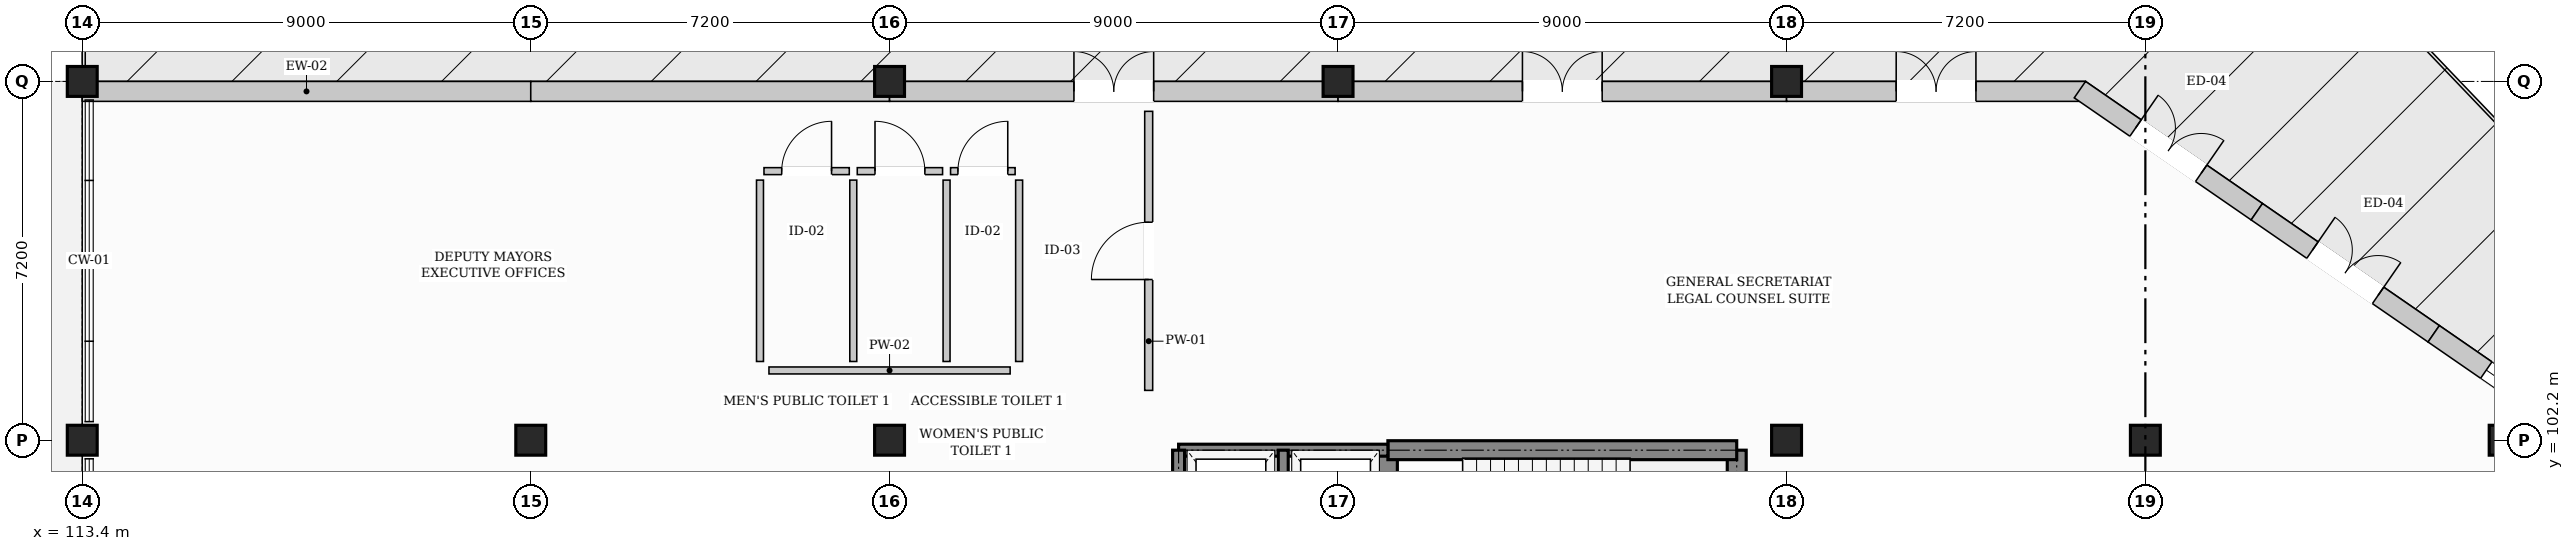
"""IFC4 building model, lengths in metres.
Left out: names, types, materials, properties, quantities, classifications, styles, units other than length and angle.
Written with IfcOpenShell. Run it as: python <this file> out.ifc"""

import sys

from ifc_helpers import new_model, si_unit, direction, frame, frame_2d, origin, origin_2d, place, context, subcontext, project, spatial, rectangle, extrude, element, fill, save


model = new_model("IFC4")
c1 = context("Model", 3, precision=1e-05, world=origin(), true_north=direction((0.0, 1.0)))
c2 = subcontext(c1, "Body", "Model", "MODEL_VIEW")
j1 = project(units=[si_unit("LENGTHUNIT", "METRE"), si_unit("PLANEANGLEUNIT", "RADIAN")], contexts=[c1])
p1 = place(None, origin())
s1 = spatial("IfcSite", under=j1, at=p1, CompositionType="ELEMENT")
p2 = place(p1, origin())
s2 = spatial("IfcBuilding", under=s1, at=p2, CompositionType="ELEMENT")
p3 = place(p2, frame((0.0, 0.0, 24.0)))
s3 = spatial("IfcBuildingStorey", under=s2, at=p3, CompositionType="ELEMENT", Elevation=24.0)
for number, where, z_axis, x_axis in (
    (1, (113.4, 102.2, 0.0), (0.0, 0.0, 1.0), (1.0, 0.0, 0.0)),
    (2, (113.4, 109.4, 0.0), (0.0, 0.0, 1.0), (1.0, 0.0, 0.0)),
    (3, (122.4, 102.2, 0.0), (0.0, 0.0, 1.0), (1.0, 0.0, 0.0)),
    (4, (129.6, 102.2, 0.0), (0.0, 0.0, 1.0), (1.0, 0.0, 0.0)),
    (5, (129.6, 109.4, 0.0), (0.0, 0.0, 1.0), (1.0, 0.0, 0.0)),
    (6, (138.6, 109.4, 0.0), (0.0, 0.0, 1.0), (1.0, 0.0, 0.0)),
    (7, (147.6, 102.2, 0.0), (0.0, 0.0, 1.0), (1.0, 0.0, 0.0)),
    (8, (147.6, 109.4, 0.0), (0.0, 0.0, 1.0), (1.0, 0.0, 0.0)),
    (9, (154.8, 102.2, 0.0), (0.0, 0.0, 1.0), (1.0, 0.0, 0.0)),
    (10, (162.0, 102.2, 0.0), (0.0, 0.0, 1.0), (1.0, 0.0, 0.0)),
):
    element("IfcColumn", number, at=place(p3, frame(where, z_axis=z_axis, x_axis=x_axis)), inside=s3, PredefinedType="COLUMN", context=c2, shape_type="SweptSolid", body=[
        extrude(rectangle(XDim=0.6, YDim=0.6, at=origin_2d()), origin(), (0.0, 0.0, 1.0), 3.6),
    ])
p4 = place(p3, frame((113.4, 109.2, 0.0), z_axis=(0.0, 0.0, 1.0), x_axis=(1.0, 0.0, 0.0)))
e11 = element("IfcWall", 11, at=p4, inside=s3, PredefinedType="SOLIDWALL", context=c2, shape_type="SweptSolid", body=[
    extrude(rectangle(XDim=9.0, YDim=0.4, at=frame_2d((4.5, 0.0))), origin(), (0.0, 0.0, 1.0), 2.8),
])
p5 = place(p3, frame((122.4, 109.2, 0.0), z_axis=(0.0, 0.0, 1.0), x_axis=(1.0, 0.0, 0.0)))
e12 = element("IfcWall", 12, at=p5, inside=s3, PredefinedType="SOLIDWALL", context=c2, shape_type="SweptSolid", body=[
    extrude(rectangle(XDim=7.2, YDim=0.4, at=frame_2d((3.6, 0.0))), origin(), (0.0, 0.0, 1.0), 2.64),
])
p6 = place(p3, frame((129.6, 109.2, 0.0), z_axis=(0.0, 0.0, 1.0), x_axis=(1.0, 0.0, 0.0)))
e13 = element("IfcWall", 13, at=p6, inside=s3, PredefinedType="SOLIDWALL", context=c2, shape_type="SweptSolid", body=[
    extrude(rectangle(XDim=9.0, YDim=0.4, at=frame_2d((4.5, 0.0))), origin(), (0.0, 0.0, 1.0), 2.64),
])
p7 = place(p6, frame((3.7, 0.0, 0.0)))
e14 = element("IfcOpeningElement", 14, at=p7, cuts=e13, PredefinedType="OPENING", context=c2, shape_type="SweptSolid", body=[
    extrude(rectangle(XDim=1.6, YDim=2.25, at=frame_2d((0.8, 1.125))), frame((0.0, 0.21, 0.0), z_axis=(0.0, -1.0, 0.0), x_axis=(1.0, 0.0, 0.0)), (0.0, 0.0, 1.0), 0.42),
])
p8 = place(p3, frame((138.6, 109.2, 0.0), z_axis=(0.0, 0.0, 1.0), x_axis=(1.0, 0.0, 0.0)))
e15 = element("IfcWall", 15, at=p8, inside=s3, PredefinedType="SOLIDWALL", context=c2, shape_type="SweptSolid", body=[
    extrude(rectangle(XDim=9.0, YDim=0.4, at=frame_2d((4.5, 0.0))), origin(), (0.0, 0.0, 1.0), 2.64),
])
p9 = place(p8, frame((3.7, 0.0, 0.0)))
e16 = element("IfcOpeningElement", 16, at=p9, cuts=e15, PredefinedType="OPENING", context=c2, shape_type="SweptSolid", body=[
    extrude(rectangle(XDim=1.6, YDim=2.25, at=frame_2d((0.8, 1.125))), frame((0.0, 0.21, 0.0), z_axis=(0.0, -1.0, 0.0), x_axis=(1.0, 0.0, 0.0)), (0.0, 0.0, 1.0), 0.42),
])
p10 = place(p3, frame((147.6, 109.2, 0.0), z_axis=(0.0, 0.0, 1.0), x_axis=(1.0, 0.0, 0.0)))
e17 = element("IfcWall", 17, at=p10, inside=s3, PredefinedType="SOLIDWALL", context=c2, shape_type="SweptSolid", body=[
    extrude(rectangle(XDim=6.0, YDim=0.4, at=frame_2d((3.0, 0.0))), origin(), (0.0, 0.0, 1.0), 2.68),
])
p11 = place(p10, frame((2.2, 0.0, 0.0)))
e18 = element("IfcOpeningElement", 18, at=p11, cuts=e17, PredefinedType="OPENING", context=c2, shape_type="SweptSolid", body=[
    extrude(rectangle(XDim=1.6, YDim=2.25, at=frame_2d((0.8, 1.125))), frame((0.0, 0.21, 0.0), z_axis=(0.0, -1.0, 0.0), x_axis=(1.0, 0.0, 0.0)), (0.0, 0.0, 1.0), 0.42),
])
p12 = place(p3, frame((153.486, 109.235, 0.0), z_axis=(0.0, 0.0, 1.0), x_axis=(0.823034869744, -0.567990847801, 0.0)))
e19 = element("IfcWall", 19, at=p12, inside=s3, PredefinedType="SOLIDWALL", context=c2, shape_type="SweptSolid", body=[
    extrude(rectangle(XDim=4.313, YDim=0.4, at=frame_2d((2.157, 0.0))), origin(), (0.0, 0.0, 1.0), 3.36),
])
p13 = place(p12, frame((1.357, 0.0, 0.0)))
e20 = element("IfcOpeningElement", 20, at=p13, cuts=e19, PredefinedType="OPENING", context=c2, shape_type="SweptSolid", body=[
    extrude(rectangle(XDim=1.6, YDim=2.25, at=frame_2d((0.8, 1.125))), frame((0.0, 0.21, 0.0), z_axis=(0.0, -1.0, 0.0), x_axis=(1.0, 0.0, 0.0)), (0.0, 0.0, 1.0), 0.42),
])
p14 = place(p3, frame((157.036, 106.785, 0.0), z_axis=(0.0, 0.0, 1.0), x_axis=(0.823034869744, -0.567990847801, 0.0)))
e21 = element("IfcWall", 21, at=p14, inside=s3, PredefinedType="SOLIDWALL", context=c2, shape_type="SweptSolid", body=[
    extrude(rectangle(XDim=4.313, YDim=0.4, at=frame_2d((2.157, 0.0))), origin(), (0.0, 0.0, 1.0), 3.36),
])
p15 = place(p14, frame((1.357, 0.0, 0.0)))
e22 = element("IfcOpeningElement", 22, at=p15, cuts=e21, PredefinedType="OPENING", context=c2, shape_type="SweptSolid", body=[
    extrude(rectangle(XDim=1.6, YDim=2.25, at=frame_2d((0.8, 1.125))), frame((0.0, 0.21, 0.0), z_axis=(0.0, -1.0, 0.0), x_axis=(1.0, 0.0, 0.0)), (0.0, 0.0, 1.0), 0.42),
])
p16 = place(p3, frame((160.586, 104.335, 0.0), z_axis=(0.0, 0.0, 1.0), x_axis=(0.823034869744, -0.567990847801, 0.0)))
e23 = element("IfcWall", 23, at=p16, inside=s3, PredefinedType="SOLIDWALL", context=c2, shape_type="SweptSolid", body=[
    extrude(rectangle(XDim=4.313, YDim=0.4, at=frame_2d((2.157, 0.0))), origin(), (0.0, 0.0, 1.0), 3.36),
])
p17 = place(p16, frame((1.282, 0.0, 0.8)))
e24 = element("IfcOpeningElement", 24, at=p17, cuts=e23, PredefinedType="OPENING", context=c2, shape_type="SweptSolid", body=[
    extrude(rectangle(XDim=1.75, YDim=1.55, at=frame_2d((0.875, 0.775))), frame((0.0, 0.21, 0.0), z_axis=(0.0, -1.0, 0.0), x_axis=(1.0, 0.0, 0.0)), (0.0, 0.0, 1.0), 0.42),
])
p18 = place(p3, frame((139.6, 96.0, 0.0), z_axis=(0.0, 0.0, 1.0), x_axis=(0.0, 1.0, 0.0)))
e25 = element("IfcWall", 25, at=p18, inside=s3, PredefinedType="SHEAR", context=c2, shape_type="SweptSolid", body=[
    extrude(rectangle(XDim=6.0, YDim=0.38, at=frame_2d((3.0, 0.0))), origin(), (0.0, 0.0, 1.0), 3.34),
])
p19 = place(p18, frame((1.275, 0.0, 0.0)))
e26 = element("IfcOpeningElement", 26, at=p19, cuts=e25, PredefinedType="OPENING", context=c2, shape_type="SweptSolid", body=[
    extrude(rectangle(XDim=1.05, YDim=2.15, at=frame_2d((0.525, 1.075))), frame((0.0, 0.2, 0.0), z_axis=(0.0, -1.0, 0.0), x_axis=(1.0, 0.0, 0.0)), (0.0, 0.0, 1.0), 0.4),
])
p20 = place(p3, frame((146.6, 96.0, 0.0), z_axis=(0.0, 0.0, 1.0), x_axis=(0.0, 1.0, 0.0)))
e27 = element("IfcWall", 27, at=p20, inside=s3, PredefinedType="SHEAR", context=c2, shape_type="SweptSolid", body=[
    extrude(rectangle(XDim=6.0, YDim=0.38, at=frame_2d((3.0, 0.0))), origin(), (0.0, 0.0, 1.0), 3.34),
])
p21 = place(p3, frame((139.6, 102.0, 0.0), z_axis=(0.0, 0.0, 1.0), x_axis=(1.0, 0.0, 0.0)))
e28 = element("IfcWall", 28, at=p21, inside=s3, PredefinedType="SHEAR", context=c2, shape_type="SweptSolid", body=[
    extrude(rectangle(XDim=7.0, YDim=0.38, at=frame_2d((3.5, 0.0))), origin(), (0.0, 0.0, 1.0), 3.34),
])
p22 = place(p3, frame((135.4, 102.0, 0.0), z_axis=(0.0, 0.0, 1.0), x_axis=(1.0, 0.0, 0.0)))
e29 = element("IfcWall", 29, at=p22, inside=s3, PredefinedType="SHEAR", context=c2, shape_type="SweptSolid", body=[
    extrude(rectangle(XDim=4.2, YDim=0.24, at=frame_2d((2.1, 0.0))), origin(), (0.0, 0.0, 1.0), 3.34),
])
p23 = place(p3, frame((135.4, 99.65, 0.0), z_axis=(0.0, 0.0, 1.0), x_axis=(0.0, 1.0, 0.0)))
e30 = element("IfcWall", 30, at=p23, inside=s3, PredefinedType="SHEAR", context=c2, shape_type="SweptSolid", body=[
    extrude(rectangle(XDim=2.35, YDim=0.24, at=frame_2d((1.175, 0.0))), origin(), (0.0, 0.0, 1.0), 3.34),
])
p24 = place(p3, frame((137.5, 99.65, 0.0), z_axis=(0.0, 0.0, 1.0), x_axis=(0.0, 1.0, 0.0)))
e31 = element("IfcWall", 31, at=p24, inside=s3, PredefinedType="SHEAR", context=c2, shape_type="SweptSolid", body=[
    extrude(rectangle(XDim=2.35, YDim=0.2, at=frame_2d((1.175, 0.0))), origin(), (0.0, 0.0, 1.0), 3.34),
])
p25 = place(p3, frame((127.18, 103.6, 0.0), z_axis=(0.0, 0.0, 1.0), x_axis=(1.0, 0.0, 0.0)))
e32 = element("IfcWall", 32, at=p25, inside=s3, PredefinedType="PARTITIONING", context=c2, shape_type="SweptSolid", body=[
    extrude(rectangle(XDim=4.84, YDim=0.14, at=frame_2d((2.42, 0.0))), origin(), (0.0, 0.0, 1.0), 3.03),
])
for number, where, z_axis, x_axis in (
    (33, (127.0, 103.78, 0.0), (0.0, 0.0, 1.0), (0.0, 1.0, 0.0)),
    (34, (132.2, 103.78, 0.0), (0.0, 0.0, 1.0), (0.0, 1.0, 0.0)),
    (35, (128.872, 103.78, 0.0), (0.0, 0.0, 1.0), (0.0, 1.0, 0.0)),
    (36, (130.744, 103.78, 0.0), (0.0, 0.0, 1.0), (0.0, 1.0, 0.0)),
):
    element("IfcWall", number, at=place(p3, frame(where, z_axis=z_axis, x_axis=x_axis)), inside=s3, PredefinedType="PARTITIONING", context=c2, shape_type="SweptSolid", body=[
        extrude(rectangle(XDim=3.64, YDim=0.14, at=frame_2d((1.82, 0.0))), origin(), (0.0, 0.0, 1.0), 3.36),
    ])
p26 = place(p3, frame((127.08, 107.6, 0.0), z_axis=(0.0, 0.0, 1.0), x_axis=(1.0, 0.0, 0.0)))
e37 = element("IfcWall", 37, at=p26, inside=s3, PredefinedType="PARTITIONING", context=c2, shape_type="SweptSolid", body=[
    extrude(rectangle(XDim=1.712, YDim=0.14, at=frame_2d((0.856, 0.0))), origin(), (0.0, 0.0, 1.0), 3.36),
])
p27 = place(p26, frame((0.356, 0.0, 0.0)))
e38 = element("IfcOpeningElement", 38, at=p27, cuts=e37, PredefinedType="OPENING", context=c2, shape_type="SweptSolid", body=[
    extrude(rectangle(XDim=1.0, YDim=2.15, at=frame_2d((0.5, 1.075))), frame((0.0, 0.08, 0.0), z_axis=(0.0, -1.0, 0.0), x_axis=(1.0, 0.0, 0.0)), (0.0, 0.0, 1.0), 0.16),
])
p28 = place(p3, frame((128.952, 107.6, 0.0), z_axis=(0.0, 0.0, 1.0), x_axis=(1.0, 0.0, 0.0)))
e39 = element("IfcWall", 39, at=p28, inside=s3, PredefinedType="PARTITIONING", context=c2, shape_type="SweptSolid", body=[
    extrude(rectangle(XDim=1.712, YDim=0.14, at=frame_2d((0.856, 0.0))), origin(), (0.0, 0.0, 1.0), 3.03),
])
p29 = place(p28, frame((0.356, 0.0, 0.0)))
e40 = element("IfcOpeningElement", 40, at=p29, cuts=e39, PredefinedType="OPENING", context=c2, shape_type="SweptSolid", body=[
    extrude(rectangle(XDim=1.0, YDim=2.15, at=frame_2d((0.5, 1.075))), frame((0.0, 0.08, 0.0), z_axis=(0.0, -1.0, 0.0), x_axis=(1.0, 0.0, 0.0)), (0.0, 0.0, 1.0), 0.16),
])
p30 = place(p3, frame((130.824, 107.6, 0.0), z_axis=(0.0, 0.0, 1.0), x_axis=(1.0, 0.0, 0.0)))
e41 = element("IfcWall", 41, at=p30, inside=s3, PredefinedType="PARTITIONING", context=c2, shape_type="SweptSolid", body=[
    extrude(rectangle(XDim=1.296, YDim=0.14, at=frame_2d((0.648, 0.0))), origin(), (0.0, 0.0, 1.0), 3.36),
])
p31 = place(p30, frame((0.148, 0.0, 0.0)))
e42 = element("IfcOpeningElement", 42, at=p31, cuts=e41, PredefinedType="OPENING", context=c2, shape_type="SweptSolid", body=[
    extrude(rectangle(XDim=1.0, YDim=2.15, at=frame_2d((0.5, 1.075))), frame((0.0, 0.08, 0.0), z_axis=(0.0, -1.0, 0.0), x_axis=(1.0, 0.0, 0.0)), (0.0, 0.0, 1.0), 0.16),
])
p32 = place(p3, frame((134.8, 103.2, 0.0), z_axis=(0.0, 0.0, 1.0), x_axis=(0.0, 1.0, 0.0)))
e43 = element("IfcWall", 43, at=p32, inside=s3, PredefinedType="PARTITIONING", context=c2, shape_type="SweptSolid", body=[
    extrude(rectangle(XDim=5.6, YDim=0.16, at=frame_2d((2.8, 0.0))), origin(), (0.0, 0.0, 1.0), 3.36),
])
p33 = place(p32, frame((2.225, 0.0, 0.0)))
e44 = element("IfcOpeningElement", 44, at=p33, cuts=e43, PredefinedType="OPENING", context=c2, shape_type="SweptSolid", body=[
    extrude(rectangle(XDim=1.15, YDim=2.2, at=frame_2d((0.575, 1.1))), frame((0.0, 0.09, 0.0), z_axis=(0.0, -1.0, 0.0), x_axis=(1.0, 0.0, 0.0)), (0.0, 0.0, 1.0), 0.18),
])
p34 = place(p7, origin())
e45 = element("IfcDoor", 45, at=p34, inside=s3, OperationType="DOUBLE_DOOR_SINGLE_SWING", PredefinedType="DOOR", context=c2, shape_type="SweptSolid", body=[
    extrude(rectangle(XDim=1.6, YDim=2.25, at=frame_2d((0.8, 1.125))), frame((0.0, 0.025, 0.0), z_axis=(0.0, -1.0, 0.0), x_axis=(1.0, 0.0, 0.0)), (0.0, 0.0, 1.0), 0.05),
])
fill(e14, e45)
p35 = place(p9, origin())
e46 = element("IfcDoor", 46, at=p35, inside=s3, OperationType="DOUBLE_DOOR_SINGLE_SWING", PredefinedType="DOOR", context=c2, shape_type="SweptSolid", body=[
    extrude(rectangle(XDim=1.6, YDim=2.25, at=frame_2d((0.8, 1.125))), frame((0.0, 0.025, 0.0), z_axis=(0.0, -1.0, 0.0), x_axis=(1.0, 0.0, 0.0)), (0.0, 0.0, 1.0), 0.05),
])
fill(e16, e46)
p36 = place(p11, origin())
e47 = element("IfcDoor", 47, at=p36, inside=s3, OperationType="DOUBLE_DOOR_SINGLE_SWING", PredefinedType="DOOR", context=c2, shape_type="SweptSolid", body=[
    extrude(rectangle(XDim=1.6, YDim=2.25, at=frame_2d((0.8, 1.125))), frame((0.0, 0.025, 0.0), z_axis=(0.0, -1.0, 0.0), x_axis=(1.0, 0.0, 0.0)), (0.0, 0.0, 1.0), 0.05),
])
fill(e18, e47)
p37 = place(p13, origin())
e48 = element("IfcDoor", 48, at=p37, inside=s3, OperationType="DOUBLE_DOOR_SINGLE_SWING", PredefinedType="DOOR", context=c2, shape_type="SweptSolid", body=[
    extrude(rectangle(XDim=1.6, YDim=2.25, at=frame_2d((0.8, 1.125))), frame((0.0, 0.025, 0.0), z_axis=(0.0, -1.0, 0.0), x_axis=(1.0, 0.0, 0.0)), (0.0, 0.0, 1.0), 0.05),
])
fill(e20, e48)
p38 = place(p15, origin())
e49 = element("IfcDoor", 49, at=p38, inside=s3, OperationType="DOUBLE_DOOR_SINGLE_SWING", PredefinedType="DOOR", context=c2, shape_type="SweptSolid", body=[
    extrude(rectangle(XDim=1.6, YDim=2.25, at=frame_2d((0.8, 1.125))), frame((0.0, 0.025, 0.0), z_axis=(0.0, -1.0, 0.0), x_axis=(1.0, 0.0, 0.0)), (0.0, 0.0, 1.0), 0.05),
])
fill(e22, e49)
p39 = place(p17, origin())
e50 = element("IfcWindow", 50, at=p39, inside=s3, PartitioningType="DOUBLE_PANEL_HORIZONTAL", PredefinedType="WINDOW", context=c2, shape_type="SweptSolid", body=[
    extrude(rectangle(XDim=1.75, YDim=1.55, at=frame_2d((0.875, 0.775))), frame((0.0, 0.03, 0.0), z_axis=(0.0, -1.0, 0.0), x_axis=(1.0, 0.0, 0.0)), (0.0, 0.0, 1.0), 0.06),
])
fill(e24, e50)
p40 = place(p27, origin())
e51 = element("IfcDoor", 51, at=p40, inside=s3, OperationType="SINGLE_SWING_RIGHT", PredefinedType="DOOR", context=c2, shape_type="SweptSolid", body=[
    extrude(rectangle(XDim=1.0, YDim=2.15, at=frame_2d((0.5, 1.075))), frame((0.0, 0.025, 0.0), z_axis=(0.0, -1.0, 0.0), x_axis=(1.0, 0.0, 0.0)), (0.0, 0.0, 1.0), 0.05),
])
fill(e38, e51)
p41 = place(p29, origin())
e52 = element("IfcDoor", 52, at=p41, inside=s3, OperationType="SINGLE_SWING_LEFT", PredefinedType="DOOR", context=c2, shape_type="SweptSolid", body=[
    extrude(rectangle(XDim=1.0, YDim=2.15, at=frame_2d((0.5, 1.075))), frame((0.0, 0.025, 0.0), z_axis=(0.0, -1.0, 0.0), x_axis=(1.0, 0.0, 0.0)), (0.0, 0.0, 1.0), 0.05),
])
fill(e40, e52)
p42 = place(p31, origin())
e53 = element("IfcDoor", 53, at=p42, inside=s3, OperationType="SINGLE_SWING_RIGHT", PredefinedType="DOOR", context=c2, shape_type="SweptSolid", body=[
    extrude(rectangle(XDim=1.0, YDim=2.15, at=frame_2d((0.5, 1.075))), frame((0.0, 0.025, 0.0), z_axis=(0.0, -1.0, 0.0), x_axis=(1.0, 0.0, 0.0)), (0.0, 0.0, 1.0), 0.05),
])
fill(e42, e53)
p43 = place(p33, origin())
e54 = element("IfcDoor", 54, at=p43, inside=s3, OperationType="SINGLE_SWING_LEFT", PredefinedType="DOOR", context=c2, shape_type="SweptSolid", body=[
    extrude(rectangle(XDim=1.15, YDim=2.2, at=frame_2d((0.575, 1.1))), frame((0.0, 0.025, 0.0), z_axis=(0.0, -1.0, 0.0), x_axis=(1.0, 0.0, 0.0)), (0.0, 0.0, 1.0), 0.05),
])
fill(e44, e54)
save(model, sys.argv[1])
